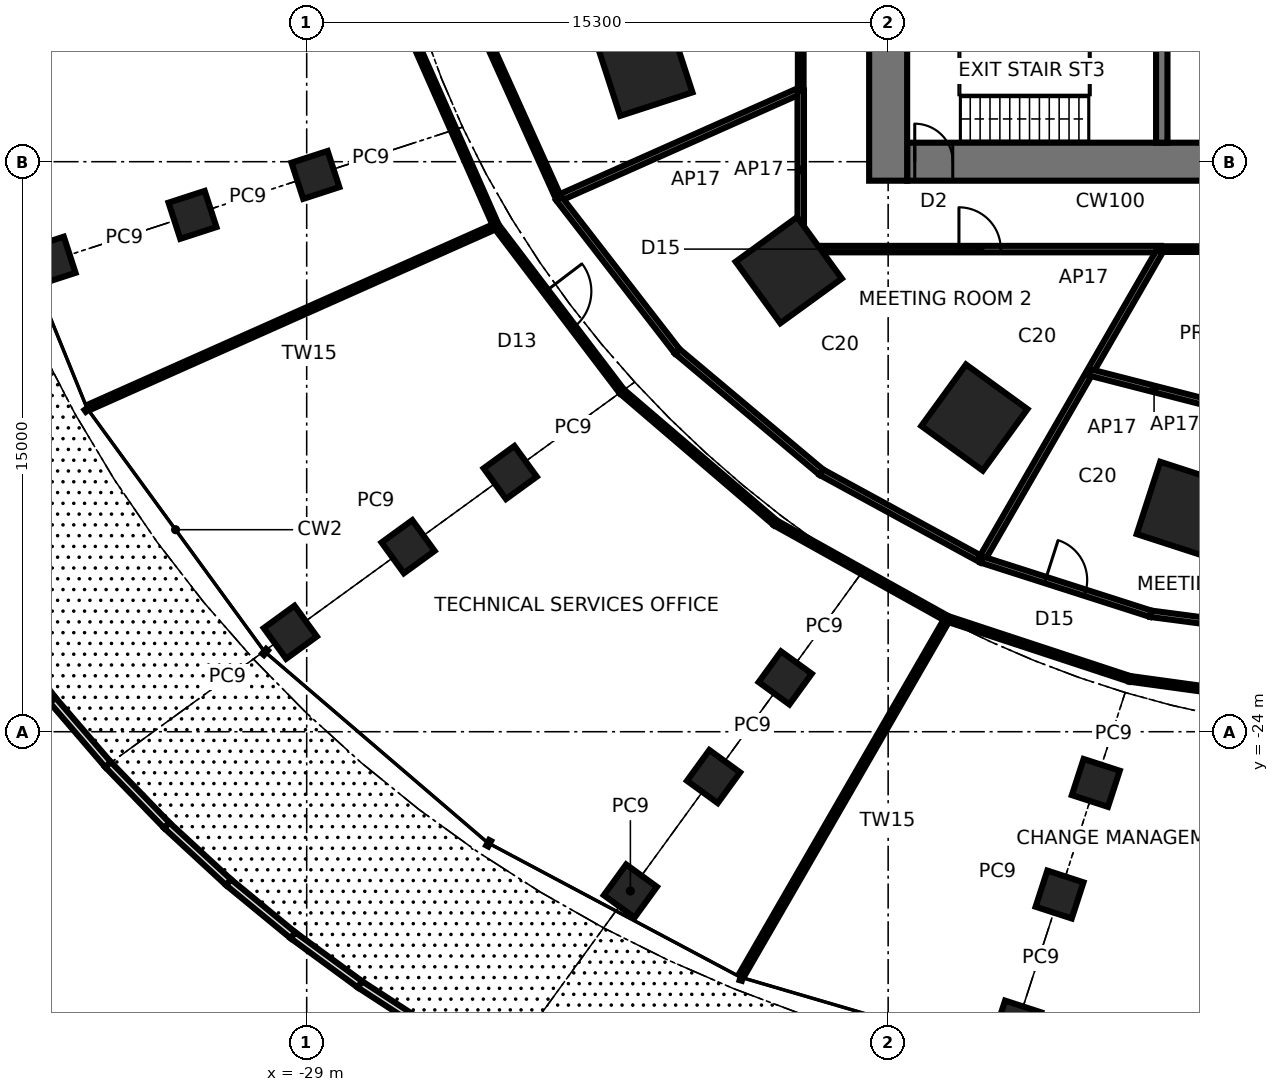
"""IFC4 building model, lengths in metres.
Left out: names, types, materials, properties, quantities, classifications, styles, units other than length and angle.
Written with IfcOpenShell. Run it as: python <this file> out.ifc"""

import sys

from ifc_helpers import new_model, si_unit, direction, frame, frame_2d, origin, origin_2d, place, context, subcontext, project, spatial, rectangle, extrude, element, fill, save


model = new_model("IFC4")
c1 = context("Model", 3, precision=1e-05, world=origin(), true_north=direction((0.0, 1.0)))
c2 = subcontext(c1, "Body", "Model", "MODEL_VIEW")
j1 = project(units=[si_unit("LENGTHUNIT", "METRE"), si_unit("PLANEANGLEUNIT", "RADIAN")], contexts=[c1])
p1 = place(None, origin())
s1 = spatial("IfcSite", under=j1, at=p1, CompositionType="ELEMENT")
p2 = place(p1, origin())
s2 = spatial("IfcBuilding", under=s1, at=p2, CompositionType="ELEMENT")
p3 = place(p2, frame((0.0, 0.0, 5.6)))
s3 = spatial("IfcBuildingStorey", under=s2, at=p3, CompositionType="ELEMENT", Elevation=5.6)
for number, where, z_axis, x_axis in (
    (1, (-20.109, -6.534, 0.0), (0.0, 0.0, 1.0), (-0.951, -0.309, 0.0)),
    (2, (-16.315, -11.854, 0.0), (0.0, 0.0, 1.0), (-0.809, -0.588, 0.0)),
    (3, (-11.43, -15.733, 0.0), (0.0, 0.0, 1.0), (-0.588, -0.809, 0.0)),
    (4, (-5.9, -18.157, 0.0), (0.0, 0.0, 1.0), (-0.309, -0.951, 0.0)),
):
    element("IfcColumn", number, at=place(p3, frame(where, z_axis=z_axis, x_axis=x_axis)), inside=s3, PredefinedType="COLUMN", context=c2, shape_type="SweptSolid", body=[
        extrude(rectangle(XDim=2.0, YDim=2.0, at=origin_2d()), origin(), (0.0, 0.0, 1.0), 5.0),
    ])
for number, where, z_axis, x_axis in (
    (5, (-35.712, -11.604, 0.0), (0.0, 0.0, 1.0), (-0.951, -0.309, 0.0)),
    (6, (-29.431, -21.383, 0.0), (0.0, 0.0, 1.0), (-0.809, -0.588, 0.0)),
    (7, (-20.483, -28.192, 0.0), (0.0, 0.0, 1.0), (-0.588, -0.809, 0.0)),
    (8, (-10.302, -31.706, 0.0), (0.0, 0.0, 1.0), (-0.309, -0.951, 0.0)),
    (9, (-32.005, -10.399, 0.0), (0.0, 0.0, 1.0), (-0.951, -0.309, 0.0)),
    (10, (-26.332, -19.131, 0.0), (0.0, 0.0, 1.0), (-0.809, -0.588, 0.0)),
    (11, (-18.294, -25.18, 0.0), (0.0, 0.0, 1.0), (-0.588, -0.809, 0.0)),
    (12, (-9.19, -28.285, 0.0), (0.0, 0.0, 1.0), (-0.309, -0.951, 0.0)),
    (13, (-28.77, -9.348, 0.0), (0.0, 0.0, 1.0), (-0.951, -0.309, 0.0)),
    (14, (-23.645, -17.179, 0.0), (0.0, 0.0, 1.0), (-0.809, -0.588, 0.0)),
    (15, (-16.409, -22.584, 0.0), (0.0, 0.0, 1.0), (-0.588, -0.809, 0.0)),
    (16, (-8.236, -25.347, 0.0), (0.0, 0.0, 1.0), (-0.309, -0.951, 0.0)),
):
    element("IfcColumn", number, at=place(p3, frame(where, z_axis=z_axis, x_axis=x_axis)), inside=s3, PredefinedType="COLUMN", context=c2, shape_type="SweptSolid", body=[
        extrude(rectangle(XDim=1.0, YDim=1.0, at=origin_2d()), origin(), (0.0, 0.0, 1.0), 5.0),
    ])
p4 = place(p3, frame((-13.2, -9.0, 0.0), z_axis=(0.0, 0.0, 1.0), x_axis=(1.0, 0.0, 0.0)))
e17 = element("IfcWall", 17, at=p4, inside=s3, PredefinedType="SHEAR", context=c2, shape_type="SweptSolid", body=[
    extrude(rectangle(XDim=26.4, YDim=1.0, at=frame_2d((13.2, 0.0))), origin(), (0.0, 0.0, 1.0), 5.0),
])
p5 = place(p4, frame((0.2, 0.0, 0.0)))
e18 = element("IfcOpeningElement", 18, at=p5, cuts=e17, PredefinedType="OPENING", context=c2, shape_type="SweptSolid", body=[
    extrude(rectangle(XDim=1.0, YDim=2.1, at=frame_2d((0.5, 1.05))), frame((0.0, 0.51, 0.0), z_axis=(0.0, -1.0, 0.0), x_axis=(1.0, 0.0, 0.0)), (0.0, 0.0, 1.0), 1.02),
])
p6 = place(p4, frame((9.5, 0.0, 0.0)))
e19 = element("IfcOpeningElement", 19, at=p6, cuts=e17, PredefinedType="OPENING", context=c2, shape_type="SweptSolid", body=[
    extrude(rectangle(XDim=0.9, YDim=2.1, at=frame_2d((0.45, 1.05))), frame((0.0, 0.51, 0.0), z_axis=(0.0, -1.0, 0.0), x_axis=(1.0, 0.0, 0.0)), (0.0, 0.0, 1.0), 1.02),
])
p7 = place(p4, frame((16.0, 0.0, 0.0)))
e20 = element("IfcOpeningElement", 20, at=p7, cuts=e17, PredefinedType="OPENING", context=c2, shape_type="SweptSolid", body=[
    extrude(rectangle(XDim=0.9, YDim=2.1, at=frame_2d((0.45, 1.05))), frame((0.0, 0.51, 0.0), z_axis=(0.0, -1.0, 0.0), x_axis=(1.0, 0.0, 0.0)), (0.0, 0.0, 1.0), 1.02),
])
p8 = place(p4, frame((22.85, 0.0, 0.0)))
e21 = element("IfcOpeningElement", 21, at=p8, cuts=e17, PredefinedType="OPENING", context=c2, shape_type="SweptSolid", body=[
    extrude(rectangle(XDim=0.9, YDim=2.1, at=frame_2d((0.45, 1.05))), frame((0.0, 0.51, 0.0), z_axis=(0.0, -1.0, 0.0), x_axis=(1.0, 0.0, 0.0)), (0.0, 0.0, 1.0), 1.02),
])
p9 = place(p3, frame((-13.7, 9.5, 0.0), z_axis=(0.0, 0.0, 1.0), x_axis=(0.0, -1.0, 0.0)))
e22 = element("IfcWall", 22, at=p9, inside=s3, PredefinedType="SHEAR", context=c2, shape_type="SweptSolid", body=[
    extrude(rectangle(XDim=19.0, YDim=1.0, at=frame_2d((9.5, 0.0))), origin(), (0.0, 0.0, 1.0), 5.0),
])
p10 = place(p9, frame((8.6, 0.0, 0.0)))
e23 = element("IfcOpeningElement", 23, at=p10, cuts=e22, PredefinedType="OPENING", context=c2, shape_type="SweptSolid", body=[
    extrude(rectangle(XDim=1.8, YDim=2.4, at=frame_2d((0.9, 1.2))), frame((0.0, 0.51, 0.0), z_axis=(0.0, -1.0, 0.0), x_axis=(1.0, 0.0, 0.0)), (0.0, 0.0, 1.0), 1.02),
])
p11 = place(p3, frame((-6.5, -4.75, 0.0), z_axis=(0.0, 0.0, 1.0), x_axis=(0.0, -1.0, 0.0)))
e24 = element("IfcWall", 24, at=p11, inside=s3, PredefinedType="SHEAR", context=c2, shape_type="SweptSolid", body=[
    extrude(rectangle(XDim=3.75, YDim=0.3, at=frame_2d((1.875, 0.0))), origin(), (0.0, 0.0, 1.0), 5.0),
])
p12 = place(p3, frame((-37.044, -21.387, 0.0), z_axis=(0.0, 0.0, 1.0), x_axis=(0.606383916635, -0.795172022675, 0.0)))
e25 = element("IfcWall", 25, at=p12, inside=s3, PredefinedType="PARAPET", context=c2, shape_type="SweptSolid", body=[
    extrude(rectangle(XDim=2.245, YDim=0.2, at=frame_2d((1.123, 0.0))), origin(), (0.0, 0.0, 1.0), 1.1),
])
p13 = place(p3, frame((-35.682, -23.172, 0.0), z_axis=(0.0, 0.0, 1.0), x_axis=(0.652005349453, -0.758214365654, 0.0)))
e26 = element("IfcWall", 26, at=p13, inside=s3, PredefinedType="PARAPET", context=c2, shape_type="SweptSolid", body=[
    extrude(rectangle(XDim=2.234, YDim=0.2, at=frame_2d((1.117, 0.0))), origin(), (0.0, 0.0, 1.0), 1.1),
])
p14 = place(p3, frame((-34.226, -24.866, 0.0), z_axis=(0.0, 0.0, 1.0), x_axis=(0.69491987314, -0.719087178244, 0.0)))
e27 = element("IfcWall", 27, at=p14, inside=s3, PredefinedType="PARAPET", context=c2, shape_type="SweptSolid", body=[
    extrude(rectangle(XDim=2.222, YDim=0.2, at=frame_2d((1.111, 0.0))), origin(), (0.0, 0.0, 1.0), 1.1),
])
p15 = place(p3, frame((-32.681, -26.465, 0.0), z_axis=(0.0, 0.0, 1.0), x_axis=(0.7351336392, -0.677922217159, 0.0)))
e28 = element("IfcWall", 28, at=p15, inside=s3, PredefinedType="PARAPET", context=c2, shape_type="SweptSolid", body=[
    extrude(rectangle(XDim=2.21, YDim=0.2, at=frame_2d((1.105, 0.0))), origin(), (0.0, 0.0, 1.0), 1.1),
])
p16 = place(p3, frame((-31.056, -27.963, 0.0), z_axis=(0.0, 0.0, 1.0), x_axis=(0.772375825238, -0.635165792993, 0.0)))
e29 = element("IfcWall", 29, at=p16, inside=s3, PredefinedType="PARAPET", context=c2, shape_type="SweptSolid", body=[
    extrude(rectangle(XDim=2.198, YDim=0.2, at=frame_2d((1.099, 0.0))), origin(), (0.0, 0.0, 1.0), 1.1),
])
p17 = place(p3, frame((-29.359, -29.359, 0.0), z_axis=(0.0, 0.0, 1.0), x_axis=(0.806749581927, -0.590893486222, 0.0)))
e30 = element("IfcWall", 30, at=p17, inside=s3, PredefinedType="PARAPET", context=c2, shape_type="SweptSolid", body=[
    extrude(rectangle(XDim=2.184, YDim=0.2, at=frame_2d((1.092, 0.0))), origin(), (0.0, 0.0, 1.0), 1.1),
])
p18 = place(p3, frame((-27.597, -30.649, 0.0), z_axis=(0.0, 0.0, 1.0), x_axis=(0.838109326127, -0.545502298307, 0.0)))
e31 = element("IfcWall", 31, at=p18, inside=s3, PredefinedType="PARAPET", context=c2, shape_type="SweptSolid", body=[
    extrude(rectangle(XDim=2.17, YDim=0.2, at=frame_2d((1.085, 0.0))), origin(), (0.0, 0.0, 1.0), 1.1),
])
p19 = place(p3, frame((-16.0, 2.481, 0.0), z_axis=(0.0, 0.0, 1.0), x_axis=(0.0, -1.0, 0.0)))
e32 = element("IfcWall", 32, at=p19, inside=s3, PredefinedType="PARTITIONING", context=c2, shape_type="SweptSolid", body=[
    extrude(rectangle(XDim=9.604, YDim=0.15, at=frame_2d((4.802, 0.0))), origin(), (0.0, 0.0, 1.0), 4.8),
])
p20 = place(p19, frame((4.202, 0.0, 0.0)))
e33 = element("IfcOpeningElement", 33, at=p20, cuts=e32, PredefinedType="OPENING", context=c2, shape_type="SweptSolid", body=[
    extrude(rectangle(XDim=1.2, YDim=2.4, at=frame_2d((0.6, 1.2))), frame((0.0, 0.085, 0.0), z_axis=(0.0, -1.0, 0.0), x_axis=(1.0, 0.0, 0.0)), (0.0, 0.0, 1.0), 0.17),
])
p21 = place(p3, frame((-22.371, -9.96, 0.0), z_axis=(0.0, 0.0, 1.0), x_axis=(-0.411114624312, 0.911583658079, 0.0)))
e34 = element("IfcWall", 34, at=p21, inside=s3, PredefinedType="PARTITIONING", context=c2, shape_type="SweptSolid", body=[
    extrude(rectangle(XDim=5.21, YDim=0.15, at=frame_2d((2.605, 0.0))), origin(), (0.0, 0.0, 1.0), 4.8),
])
p22 = place(p3, frame((-26.273, -5.585, 0.0), z_axis=(0.0, 0.0, 1.0), x_axis=(0.404430072411, -0.914568923882, 0.0)))
e35 = element("IfcWall", 35, at=p22, inside=s3, PredefinedType="PARTITIONING", context=c2, shape_type="SweptSolid", body=[
    extrude(rectangle(XDim=5.584, YDim=0.15, at=frame_2d((2.792, 0.0))), origin(), (0.0, 0.0, 1.0), 4.8),
])
p23 = place(p3, frame((-24.015, -10.692, 0.0), z_axis=(0.0, 0.0, 1.0), x_axis=(-0.91354558487, -0.406736357318, 0.0)))
e36 = element("IfcWall", 36, at=p23, inside=s3, PredefinedType="PARTITIONING", context=c2, shape_type="SweptSolid", body=[
    extrude(rectangle(XDim=11.705, YDim=0.15, at=frame_2d((5.853, 0.0))), origin(), (0.0, 0.0, 1.0), 4.8),
])
p24 = place(p3, frame((-16.0, -7.124, 0.0), z_axis=(0.0, 0.0, 1.0), x_axis=(-0.913555829465, -0.406713346781, 0.0)))
e37 = element("IfcWall", 37, at=p24, inside=s3, PredefinedType="PARTITIONING", context=c2, shape_type="SweptSolid", body=[
    extrude(rectangle(XDim=6.973, YDim=0.17, at=frame_2d((3.487, 0.0))), origin(), (0.0, 0.0, 1.0), 4.8),
])
p25 = place(p3, frame((-19.252, -13.987, 0.0), z_axis=(0.0, 0.0, 1.0), x_axis=(-0.612260193331, 0.790656344856, 0.0)))
e38 = element("IfcWall", 38, at=p25, inside=s3, PredefinedType="PARTITIONING", context=c2, shape_type="SweptSolid", body=[
    extrude(rectangle(XDim=5.094, YDim=0.17, at=frame_2d((2.547, 0.0))), origin(), (0.0, 0.0, 1.0), 4.8),
])
p26 = place(p3, frame((-24.015, -10.692, 0.0), z_axis=(0.0, 0.0, 1.0), x_axis=(0.604897551992, -0.79630330377, 0.0)))
e39 = element("IfcWall", 39, at=p26, inside=s3, PredefinedType="PARTITIONING", context=c2, shape_type="SweptSolid", body=[
    extrude(rectangle(XDim=5.467, YDim=0.15, at=frame_2d((2.733, 0.0))), origin(), (0.0, 0.0, 1.0), 4.8),
])
p27 = place(p26, frame((2.158, 0.0, 0.0)))
e40 = element("IfcOpeningElement", 40, at=p27, cuts=e39, PredefinedType="OPENING", context=c2, shape_type="SweptSolid", body=[
    extrude(rectangle(XDim=1.2, YDim=2.4, at=frame_2d((0.6, 1.2))), frame((0.0, 0.085, 0.0), z_axis=(0.0, -1.0, 0.0), x_axis=(1.0, 0.0, 0.0)), (0.0, 0.0, 1.0), 0.17),
])
p28 = place(p3, frame((-16.0, -7.124, 0.0), z_axis=(0.0, 0.0, 1.0), x_axis=(0.0, -1.0, 0.0)))
e41 = element("IfcWall", 41, at=p28, inside=s3, PredefinedType="PARTITIONING", context=c2, shape_type="SweptSolid", body=[
    extrude(rectangle(XDim=4.176, YDim=0.17, at=frame_2d((2.088, 0.0))), origin(), (0.0, 0.0, 1.0), 4.8),
])
p29 = place(p3, frame((-15.46, -17.17, 0.0), z_axis=(0.0, 0.0, 1.0), x_axis=(-0.76601371381, 0.642824229673, 0.0)))
e42 = element("IfcWall", 42, at=p29, inside=s3, PredefinedType="PARTITIONING", context=c2, shape_type="SweptSolid", body=[
    extrude(rectangle(XDim=4.951, YDim=0.17, at=frame_2d((2.475, 0.0))), origin(), (0.0, 0.0, 1.0), 4.8),
])
p30 = place(p3, frame((-20.708, -15.045, 0.0), z_axis=(0.0, 0.0, 1.0), x_axis=(0.759657885164, -0.650322917871, 0.0)))
e43 = element("IfcWall", 43, at=p30, inside=s3, PredefinedType="PARTITIONING", context=c2, shape_type="SweptSolid", body=[
    extrude(rectangle(XDim=5.323, YDim=0.15, at=frame_2d((2.662, 0.0))), origin(), (0.0, 0.0, 1.0), 4.8),
])
p31 = place(p3, frame((-16.0, -11.3, 0.0), z_axis=(0.0, 0.0, 1.0), x_axis=(1.0, 0.0, 0.0)))
e44 = element("IfcWall", 44, at=p31, inside=s3, PredefinedType="PARTITIONING", context=c2, shape_type="SweptSolid", body=[
    extrude(rectangle(XDim=9.476, YDim=0.17, at=frame_2d((4.738, 0.0))), origin(), (0.0, 0.0, 1.0), 4.8),
])
p32 = place(p31, frame((4.163, 0.0, 0.0)))
e45 = element("IfcOpeningElement", 45, at=p32, cuts=e44, PredefinedType="OPENING", context=c2, shape_type="SweptSolid", body=[
    extrude(rectangle(XDim=1.1, YDim=2.4, at=frame_2d((0.55, 1.2))), frame((0.0, 0.095, 0.0), z_axis=(0.0, -1.0, 0.0), x_axis=(1.0, 0.0, 0.0)), (0.0, 0.0, 1.0), 0.19),
])
p33 = place(p3, frame((-11.241, -19.47, 0.0), z_axis=(0.0, 0.0, 1.0), x_axis=(-0.877969347956, 0.478716851646, 0.0)))
e46 = element("IfcWall", 46, at=p33, inside=s3, PredefinedType="PARTITIONING", context=c2, shape_type="SweptSolid", body=[
    extrude(rectangle(XDim=4.805, YDim=0.17, at=frame_2d((2.403, 0.0))), origin(), (0.0, 0.0, 1.0), 4.8),
])
p34 = place(p3, frame((-16.664, -18.507, 0.0), z_axis=(0.0, 0.0, 1.0), x_axis=(0.873440229319, -0.486931376898, 0.0)))
e47 = element("IfcWall", 47, at=p34, inside=s3, PredefinedType="PARTITIONING", context=c2, shape_type="SweptSolid", body=[
    extrude(rectangle(XDim=5.178, YDim=0.15, at=frame_2d((2.589, 0.0))), origin(), (0.0, 0.0, 1.0), 4.8),
])
p35 = place(p3, frame((-6.524, -11.3, 0.0), z_axis=(0.0, 0.0, 1.0), x_axis=(-0.499991277142, -0.86603043987, 0.0)))
e48 = element("IfcWall", 48, at=p35, inside=s3, PredefinedType="PARTITIONING", context=c2, shape_type="SweptSolid", body=[
    extrude(rectangle(XDim=9.434, YDim=0.17, at=frame_2d((4.717, 0.0))), origin(), (0.0, 0.0, 1.0), 4.8),
])
p36 = place(p3, frame((-12.141, -21.029, 0.0), z_axis=(0.0, 0.0, 1.0), x_axis=(-0.500001376791, -0.866024608893, 0.0)))
e49 = element("IfcWall", 49, at=p36, inside=s3, PredefinedType="PARTITIONING", context=c2, shape_type="SweptSolid", body=[
    extrude(rectangle(XDim=10.81, YDim=0.15, at=frame_2d((5.405, 0.0))), origin(), (0.0, 0.0, 1.0), 4.8),
])
p37 = place(p3, frame((-5.008, -15.414, 0.0), z_axis=(0.0, 0.0, 1.0), x_axis=(-0.968562622374, 0.248769866625, 0.0)))
e50 = element("IfcWall", 50, at=p37, inside=s3, PredefinedType="PARTITIONING", context=c2, shape_type="SweptSolid", body=[
    extrude(rectangle(XDim=3.499, YDim=0.17, at=frame_2d((1.75, 0.0))), origin(), (0.0, 0.0, 1.0), 4.8),
])
p38 = place(p3, frame((-6.79, -20.896, 0.0), z_axis=(0.0, 0.0, 1.0), x_axis=(-0.952311283162, 0.305128202503, 0.0)))
e51 = element("IfcWall", 51, at=p38, inside=s3, PredefinedType="PARTITIONING", context=c2, shape_type="SweptSolid", body=[
    extrude(rectangle(XDim=4.674, YDim=0.17, at=frame_2d((2.337, 0.0))), origin(), (0.0, 0.0, 1.0), 4.8),
])
p39 = place(p38, frame((1.812, 0.0, 0.0)))
e52 = element("IfcOpeningElement", 52, at=p39, cuts=e51, PredefinedType="OPENING", context=c2, shape_type="SweptSolid", body=[
    extrude(rectangle(XDim=1.1, YDim=2.4, at=frame_2d((0.55, 1.2))), frame((0.0, 0.095, 0.0), z_axis=(0.0, -1.0, 0.0), x_axis=(1.0, 0.0, 0.0)), (0.0, 0.0, 1.0), 0.19),
])
p40 = place(p3, frame((-12.141, -21.029, 0.0), z_axis=(0.0, 0.0, 1.0), x_axis=(0.949808812445, -0.312830976412, 0.0)))
e53 = element("IfcWall", 53, at=p40, inside=s3, PredefinedType="PARTITIONING", context=c2, shape_type="SweptSolid", body=[
    extrude(rectangle(XDim=5.049, YDim=0.15, at=frame_2d((2.524, 0.0))), origin(), (0.0, 0.0, 1.0), 4.8),
])
p41 = place(p3, frame((-6.524, -11.3, 0.0), z_axis=(0.0, 0.0, 1.0), x_axis=(1.0, 0.0, 0.0)))
e54 = element("IfcWall", 54, at=p41, inside=s3, PredefinedType="PARTITIONING", context=c2, shape_type="SweptSolid", body=[
    extrude(rectangle(XDim=5.336, YDim=0.15, at=frame_2d((2.668, 0.0))), origin(), (0.0, 0.0, 1.0), 4.8),
])
p42 = place(p41, frame((2.068, 0.0, 0.0)))
e55 = element("IfcOpeningElement", 55, at=p42, cuts=e54, PredefinedType="OPENING", context=c2, shape_type="SweptSolid", body=[
    extrude(rectangle(XDim=1.2, YDim=2.4, at=frame_2d((0.6, 1.2))), frame((0.0, 0.085, 0.0), z_axis=(0.0, -1.0, 0.0), x_axis=(1.0, 0.0, 0.0)), (0.0, 0.0, 1.0), 0.17),
])
p43 = place(p3, frame((-2.259, -21.491, 0.0), z_axis=(0.0, 0.0, 1.0), x_axis=(-0.991487722643, 0.130200214467, 0.0)))
e56 = element("IfcWall", 56, at=p43, inside=s3, PredefinedType="PARTITIONING", context=c2, shape_type="SweptSolid", body=[
    extrude(rectangle(XDim=4.57, YDim=0.17, at=frame_2d((2.285, 0.0))), origin(), (0.0, 0.0, 1.0), 4.8),
])
p44 = place(p3, frame((-7.346, -22.608, 0.0), z_axis=(0.0, 0.0, 1.0), x_axis=(0.990692659729, -0.136117794422, 0.0)))
e57 = element("IfcWall", 57, at=p44, inside=s3, PredefinedType="PARTITIONING", context=c2, shape_type="SweptSolid", body=[
    extrude(rectangle(XDim=4.945, YDim=0.15, at=frame_2d((2.473, 0.0))), origin(), (0.0, 0.0, 1.0), 4.8),
])
p45 = place(p44, frame((1.872, 0.0, 0.0)))
e58 = element("IfcOpeningElement", 58, at=p45, cuts=e57, PredefinedType="OPENING", context=c2, shape_type="SweptSolid", body=[
    extrude(rectangle(XDim=1.2, YDim=2.4, at=frame_2d((0.6, 1.2))), frame((0.0, 0.085, 0.0), z_axis=(0.0, -1.0, 0.0), x_axis=(1.0, 0.0, 0.0)), (0.0, 0.0, 1.0), 0.17),
])
p46 = place(p5, origin())
e59 = element("IfcDoor", 59, at=p46, inside=s3, OperationType="SINGLE_SWING_LEFT", PredefinedType="DOOR", context=c2, shape_type="SweptSolid", body=[
    extrude(rectangle(XDim=0.92, YDim=2.06, at=frame_2d((0.5, 1.03))), frame((0.0, 0.025, 0.0), z_axis=(0.0, -1.0, 0.0), x_axis=(1.0, 0.0, 0.0)), (0.0, 0.0, 1.0), 0.05),
    extrude(rectangle(XDim=0.04, YDim=2.1, at=frame_2d((0.02, 1.05))), frame((0.0, 0.25, 0.0), z_axis=(0.0, -1.0, 0.0), x_axis=(1.0, 0.0, 0.0)), (0.0, 0.0, 1.0), 0.5),
    extrude(rectangle(XDim=0.04, YDim=2.1, at=frame_2d((0.98, 1.05))), frame((0.0, 0.25, 0.0), z_axis=(0.0, -1.0, 0.0), x_axis=(1.0, 0.0, 0.0)), (0.0, 0.0, 1.0), 0.5),
    extrude(rectangle(XDim=0.92, YDim=0.04, at=frame_2d((0.5, 2.08))), frame((0.0, 0.25, 0.0), z_axis=(0.0, -1.0, 0.0), x_axis=(1.0, 0.0, 0.0)), (0.0, 0.0, 1.0), 0.5),
])
fill(e18, e59)
p47 = place(p32, origin())
e60 = element("IfcDoor", 60, at=p47, inside=s3, OperationType="SINGLE_SWING_LEFT", PredefinedType="DOOR", context=c2, shape_type="SweptSolid", body=[
    extrude(rectangle(XDim=1.1, YDim=2.4, at=frame_2d((0.55, 1.2))), frame((0.0, 0.025, 0.0), z_axis=(0.0, -1.0, 0.0), x_axis=(1.0, 0.0, 0.0)), (0.0, 0.0, 1.0), 0.05),
])
fill(e45, e60)
p48 = place(p39, frame((1.1, 0.0, 0.0), z_axis=(0.0, 0.0, 1.0), x_axis=(-1.0, 0.0, 0.0)))
e61 = element("IfcDoor", 61, at=p48, inside=s3, OperationType="SINGLE_SWING_LEFT", PredefinedType="DOOR", context=c2, shape_type="SweptSolid", body=[
    extrude(rectangle(XDim=1.1, YDim=2.4, at=frame_2d((0.55, 1.2))), frame((0.0, 0.025, 0.0), z_axis=(0.0, -1.0, 0.0), x_axis=(1.0, 0.0, 0.0)), (0.0, 0.0, 1.0), 0.05),
])
fill(e52, e61)
p49 = place(p27, origin())
e62 = element("IfcDoor", 62, at=p49, inside=s3, OperationType="SINGLE_SWING_LEFT", PredefinedType="DOOR", context=c2, shape_type="SweptSolid", body=[
    extrude(rectangle(XDim=1.2, YDim=2.4, at=frame_2d((0.6, 1.2))), frame((0.0, 0.025, 0.0), z_axis=(0.0, -1.0, 0.0), x_axis=(1.0, 0.0, 0.0)), (0.0, 0.0, 1.0), 0.05),
])
fill(e40, e62)
save(model, sys.argv[1])
